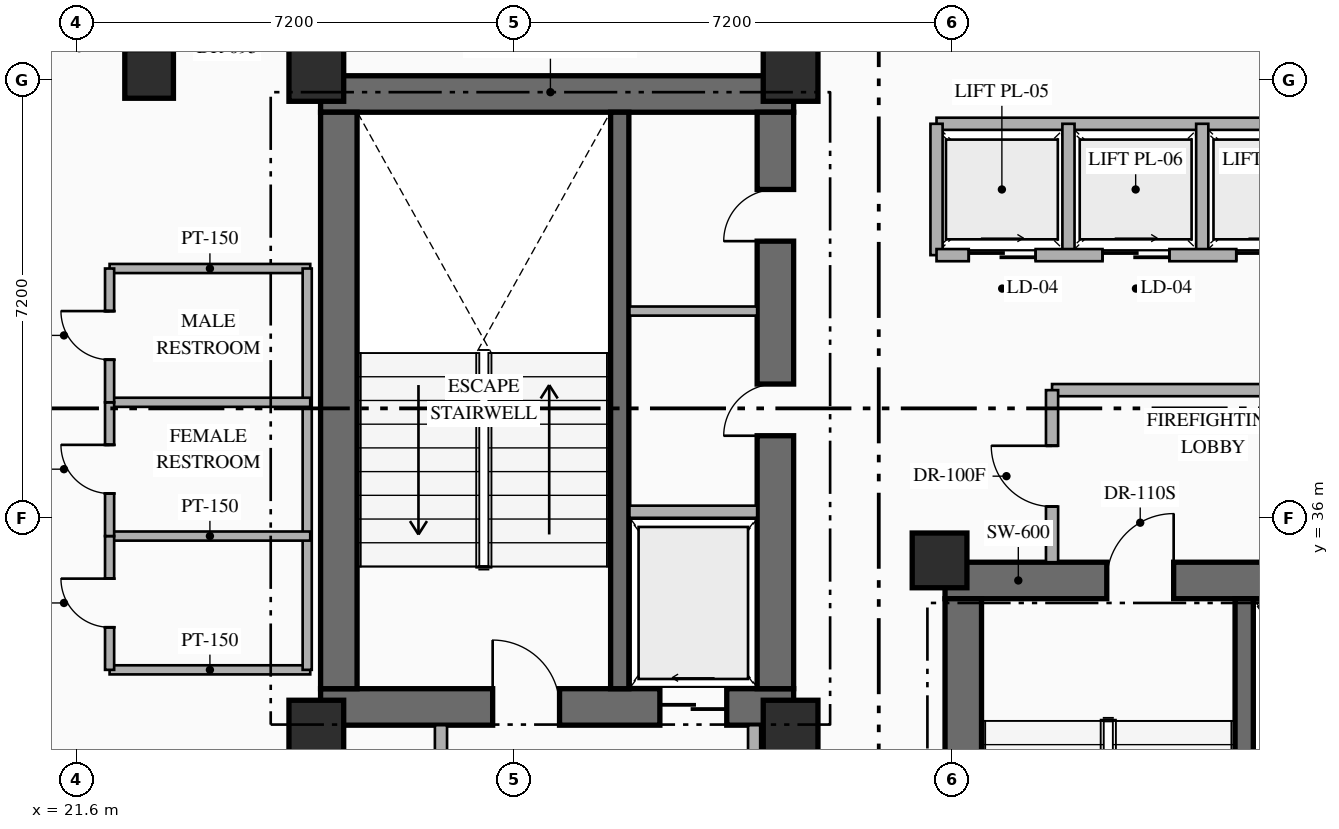
"""IFC4 building model, lengths in metres.
Left out: names, types, materials, properties, quantities, classifications, styles, units other than length and angle.
Written with IfcOpenShell. Run it as: python <this file> out.ifc"""

import sys

from ifc_helpers import new_model, si_unit, direction, frame, frame_2d, origin, origin_2d, place, context, subcontext, project, spatial, rectangle, hollow_rectangle, extrude, element, fill, save


model = new_model("IFC4")
c1 = context("Model", 3, precision=1e-05, world=origin(), true_north=direction((0.0, 1.0)))
c2 = subcontext(c1, "Body", "Model", "MODEL_VIEW")
j1 = project(units=[si_unit("LENGTHUNIT", "METRE"), si_unit("PLANEANGLEUNIT", "RADIAN")], contexts=[c1])
p1 = place(None, origin())
s1 = spatial("IfcSite", under=j1, at=p1, CompositionType="ELEMENT")
p2 = place(p1, origin())
s2 = spatial("IfcBuilding", under=s1, at=p2, CompositionType="ELEMENT")
p3 = place(p2, frame((0.0, 0.0, 156.45)))
s3 = spatial("IfcBuildingStorey", under=s2, at=p3, CompositionType="ELEMENT", Elevation=156.45)
p4 = place(p3, frame((25.62, 32.89, 0.0), z_axis=(0.0, 0.0, 1.0), x_axis=(1.0, 0.0, 0.0)))
e1 = element("IfcWall", 1, at=p4, inside=s3, PredefinedType="SHEAR", context=c2, shape_type="SweptSolid", body=[
    extrude(rectangle(XDim=7.78, YDim=0.6, at=frame_2d((3.89, 0.0))), origin(), (0.0, 0.0, 1.0), 3.6),
])
p5 = place(p4, frame((2.83, 0.0, 0.0)))
e2 = element("IfcOpeningElement", 2, at=p5, cuts=e1, PredefinedType="OPENING", context=c2, shape_type="SweptSolid", body=[
    extrude(rectangle(XDim=1.1, YDim=2.2, at=frame_2d((0.55, 1.1))), frame((0.0, 0.31, 0.0), z_axis=(0.0, -1.0, 0.0), x_axis=(1.0, 0.0, 0.0)), (0.0, 0.0, 1.0), 0.62),
])
p6 = place(p4, frame((5.58, 0.0, 0.0)))
e3 = element("IfcOpeningElement", 3, at=p6, cuts=e1, PredefinedType="OPENING", context=c2, shape_type="SweptSolid", body=[
    extrude(rectangle(XDim=1.1, YDim=2.15, at=frame_2d((0.55, 1.075))), frame((0.0, 0.31, 0.0), z_axis=(0.0, -1.0, 0.0), x_axis=(1.0, 0.0, 0.0)), (0.0, 0.0, 1.0), 0.62),
])
p7 = place(p3, frame((25.62, 42.97, 0.0), z_axis=(0.0, 0.0, 1.0), x_axis=(1.0, 0.0, 0.0)))
e4 = element("IfcWall", 4, at=p7, inside=s3, PredefinedType="SHEAR", context=c2, shape_type="SweptSolid", body=[
    extrude(rectangle(XDim=7.78, YDim=0.6, at=frame_2d((3.89, 0.0))), origin(), (0.0, 0.0, 1.0), 3.6),
])
p8 = place(p3, frame((25.92, 33.19, 0.0), z_axis=(0.0, 0.0, 1.0), x_axis=(0.0, 1.0, 0.0)))
e5 = element("IfcWall", 5, at=p8, inside=s3, PredefinedType="SHEAR", context=c2, shape_type="SweptSolid", body=[
    extrude(rectangle(XDim=9.48, YDim=0.6, at=frame_2d((4.74, 0.0))), origin(), (0.0, 0.0, 1.0), 3.6),
])
p9 = place(p3, frame((33.1, 33.19, 0.0), z_axis=(0.0, 0.0, 1.0), x_axis=(0.0, 1.0, 0.0)))
e6 = element("IfcWall", 6, at=p9, inside=s3, PredefinedType="SHEAR", context=c2, shape_type="SweptSolid", body=[
    extrude(rectangle(XDim=9.48, YDim=0.6, at=frame_2d((4.74, 0.0))), origin(), (0.0, 0.0, 1.0), 3.6),
])
p10 = place(p9, frame((4.16, 0.0, 0.0)))
e7 = element("IfcOpeningElement", 7, at=p10, cuts=e6, PredefinedType="OPENING", context=c2, shape_type="SweptSolid", body=[
    extrude(rectangle(XDim=0.85, YDim=2.08, at=frame_2d((0.425, 1.04))), frame((0.0, 0.31, 0.0), z_axis=(0.0, -1.0, 0.0), x_axis=(1.0, 0.0, 0.0)), (0.0, 0.0, 1.0), 0.62),
])
p11 = place(p9, frame((7.36, 0.0, 0.0)))
e8 = element("IfcOpeningElement", 8, at=p11, cuts=e6, PredefinedType="OPENING", context=c2, shape_type="SweptSolid", body=[
    extrude(rectangle(XDim=0.85, YDim=2.08, at=frame_2d((0.425, 1.04))), frame((0.0, 0.31, 0.0), z_axis=(0.0, -1.0, 0.0), x_axis=(1.0, 0.0, 0.0)), (0.0, 0.0, 1.0), 0.62),
])
p12 = place(p3, frame((30.54, 33.19, 0.0), z_axis=(0.0, 0.0, 1.0), x_axis=(0.0, 1.0, 0.0)))
e9 = element("IfcWall", 9, at=p12, inside=s3, PredefinedType="SHEAR", context=c2, shape_type="SweptSolid", body=[
    extrude(rectangle(XDim=9.48, YDim=0.3, at=frame_2d((4.74, 0.0))), origin(), (0.0, 0.0, 1.0), 3.6),
])
p13 = place(p3, frame((35.89, 34.97, 0.0), z_axis=(0.0, 0.0, 1.0), x_axis=(1.0, 0.0, 0.0)))
e10 = element("IfcWall", 10, at=p13, inside=s3, PredefinedType="SHEAR", context=c2, shape_type="SweptSolid", body=[
    extrude(rectangle(XDim=7.76, YDim=0.6, at=frame_2d((3.88, 0.0))), origin(), (0.0, 0.0, 1.0), 3.6),
])
p14 = place(p13, frame((2.66, 0.0, 0.0)))
e11 = element("IfcOpeningElement", 11, at=p14, cuts=e10, PredefinedType="OPENING", context=c2, shape_type="SweptSolid", body=[
    extrude(rectangle(XDim=1.1, YDim=2.2, at=frame_2d((0.55, 1.1))), frame((0.0, 0.31, 0.0), z_axis=(0.0, -1.0, 0.0), x_axis=(1.0, 0.0, 0.0)), (0.0, 0.0, 1.0), 0.62),
])
p15 = place(p13, frame((5.56, 0.0, 0.0)))
e12 = element("IfcOpeningElement", 12, at=p15, cuts=e10, PredefinedType="OPENING", context=c2, shape_type="SweptSolid", body=[
    extrude(rectangle(XDim=1.12, YDim=2.15, at=frame_2d((0.56, 1.075))), frame((0.0, 0.31, 0.0), z_axis=(0.0, -1.0, 0.0), x_axis=(1.0, 0.0, 0.0)), (0.0, 0.0, 1.0), 0.62),
])
p16 = place(p3, frame((36.19, 25.19, 0.0), z_axis=(0.0, 0.0, 1.0), x_axis=(0.0, 1.0, 0.0)))
e13 = element("IfcWall", 13, at=p16, inside=s3, PredefinedType="SHEAR", context=c2, shape_type="SweptSolid", body=[
    extrude(rectangle(XDim=9.48, YDim=0.6, at=frame_2d((4.74, 0.0))), origin(), (0.0, 0.0, 1.0), 3.6),
])
p17 = place(p3, frame((40.81, 25.19, 0.0), z_axis=(0.0, 0.0, 1.0), x_axis=(0.0, 1.0, 0.0)))
e14 = element("IfcWall", 14, at=p17, inside=s3, PredefinedType="SHEAR", context=c2, shape_type="SweptSolid", body=[
    extrude(rectangle(XDim=9.48, YDim=0.3, at=frame_2d((4.74, 0.0))), origin(), (0.0, 0.0, 1.0), 3.6),
])
for number, where, z_axis, x_axis in (
    (15, (25.55, 32.55, 0.0), (0.0, 0.0, 1.0), (1.0, 0.0, 0.0)),
    (16, (33.35, 32.55, 0.0), (0.0, 0.0, 1.0), (1.0, 0.0, 0.0)),
    (17, (25.55, 43.3, 0.0), (0.0, 0.0, 1.0), (1.0, 0.0, 0.0)),
    (18, (33.35, 43.3, 0.0), (0.0, 0.0, 1.0), (1.0, 0.0, 0.0)),
    (19, (35.8, 35.3, 0.0), (0.0, 0.0, 1.0), (1.0, 0.0, 0.0)),
):
    element("IfcColumn", number, at=place(p3, frame(where, z_axis=z_axis, x_axis=x_axis)), inside=s3, PredefinedType="COLUMN", context=c2, shape_type="SweptSolid", body=[
        extrude(rectangle(XDim=0.9, YDim=0.9, at=origin_2d()), origin(), (0.0, 0.0, 1.0), 3.6),
    ])
p18 = place(p3, frame((22.8, 43.3, 0.0), z_axis=(0.0, 0.0, 1.0), x_axis=(1.0, 0.0, 0.0)))
e20 = element("IfcColumn", 20, at=p18, inside=s3, PredefinedType="COLUMN", context=c2, shape_type="SweptSolid", body=[
    extrude(hollow_rectangle(XDim=0.8, YDim=0.8, WallThickness=0.032, at=origin_2d()), origin(), (0.0, 0.0, 1.0), 3.6),
])
p19 = place(p3, frame((30.7, 36.1, 0.0), z_axis=(0.0, 0.0, 1.0), x_axis=(1.0, 0.0, 0.0)))
e21 = element("IfcWall", 21, at=p19, inside=s3, PredefinedType="STANDARD", context=c2, shape_type="SweptSolid", body=[
    extrude(rectangle(XDim=2.1, YDim=0.2, at=frame_2d((1.05, 0.0))), origin(), (0.0, 0.0, 1.0), 3.35),
])
p20 = place(p3, frame((30.7, 39.4, 0.0), z_axis=(0.0, 0.0, 1.0), x_axis=(1.0, 0.0, 0.0)))
e22 = element("IfcWall", 22, at=p20, inside=s3, PredefinedType="PARTITIONING", context=c2, shape_type="SweptSolid", body=[
    extrude(rectangle(XDim=2.1, YDim=0.15, at=frame_2d((1.05, 0.0))), origin(), (0.0, 0.0, 1.0), 3.35),
])
p21 = place(p3, frame((27.6, 29.2, 0.0), z_axis=(0.0, 0.0, 1.0), x_axis=(0.0, 1.0, 0.0)))
e23 = element("IfcWall", 23, at=p21, inside=s3, PredefinedType="STANDARD", context=c2, shape_type="SweptSolid", body=[
    extrude(rectangle(XDim=3.39, YDim=0.2, at=frame_2d((1.695, 0.0))), origin(), (0.0, 0.0, 1.0), 3.35),
])
p22 = place(p3, frame((32.75, 29.2, 0.0), z_axis=(0.0, 0.0, 1.0), x_axis=(0.0, 1.0, 0.0)))
e24 = element("IfcWall", 24, at=p22, inside=s3, PredefinedType="STANDARD", context=c2, shape_type="SweptSolid", body=[
    extrude(rectangle(XDim=3.39, YDim=0.2, at=frame_2d((1.695, 0.0))), origin(), (0.0, 0.0, 1.0), 3.35),
])
p23 = place(p22, frame((1.45, 0.0, 0.0)))
e25 = element("IfcOpeningElement", 25, at=p23, cuts=e24, PredefinedType="OPENING", context=c2, shape_type="SweptSolid", body=[
    extrude(rectangle(XDim=1.0, YDim=2.2, at=frame_2d((0.5, 1.1))), frame((0.0, 0.11, 0.0), z_axis=(0.0, -1.0, 0.0), x_axis=(1.0, 0.0, 0.0)), (0.0, 0.0, 1.0), 0.22),
])
p24 = place(p3, frame((37.65, 38.1, 0.0), z_axis=(0.0, 0.0, 1.0), x_axis=(1.0, 0.0, 0.0)))
e26 = element("IfcWall", 26, at=p24, inside=s3, PredefinedType="STANDARD", context=c2, shape_type="SweptSolid", body=[
    extrude(rectangle(XDim=5.3, YDim=0.2, at=frame_2d((2.65, 0.0))), origin(), (0.0, 0.0, 1.0), 3.35),
])
p25 = place(p3, frame((37.65, 35.27, 0.0), z_axis=(0.0, 0.0, 1.0), x_axis=(0.0, 1.0, 0.0)))
e27 = element("IfcWall", 27, at=p25, inside=s3, PredefinedType="STANDARD", context=c2, shape_type="SweptSolid", body=[
    extrude(rectangle(XDim=2.83, YDim=0.2, at=frame_2d((1.415, 0.0))), origin(), (0.0, 0.0, 1.0), 3.35),
])
p26 = place(p25, frame((0.915, 0.0, 0.0)))
e28 = element("IfcOpeningElement", 28, at=p26, cuts=e27, PredefinedType="OPENING", context=c2, shape_type="SweptSolid", body=[
    extrude(rectangle(XDim=1.0, YDim=2.2, at=frame_2d((0.5, 1.1))), frame((0.0, 0.11, 0.0), z_axis=(0.0, -1.0, 0.0), x_axis=(1.0, 0.0, 0.0)), (0.0, 0.0, 1.0), 0.22),
])
p27 = place(p3, frame((35.75, 42.48, 0.0), z_axis=(0.0, 0.0, 1.0), x_axis=(1.0, 0.0, 0.0)))
e29 = element("IfcWall", 29, at=p27, inside=s3, PredefinedType="STANDARD", context=c2, shape_type="SweptSolid", body=[
    extrude(rectangle(XDim=9.11, YDim=0.2, at=frame_2d((4.555, 0.0))), origin(), (0.0, 0.0, 1.0), 3.35),
])
for number, where, z_axis, x_axis in (
    (30, (35.75, 40.32, 0.0), (0.0, 0.0, 1.0), (0.0, 1.0, 0.0)),
    (31, (37.92, 40.32, 0.0), (0.0, 0.0, 1.0), (0.0, 1.0, 0.0)),
    (32, (40.12, 40.32, 0.0), (0.0, 0.0, 1.0), (0.0, 1.0, 0.0)),
):
    element("IfcWall", number, at=place(p3, frame(where, z_axis=z_axis, x_axis=x_axis)), inside=s3, PredefinedType="STANDARD", context=c2, shape_type="SweptSolid", body=[
        extrude(rectangle(XDim=2.16, YDim=0.2, at=frame_2d((1.08, 0.0))), origin(), (0.0, 0.0, 1.0), 3.35),
    ])
p28 = place(p3, frame((35.75, 40.32, 0.0), z_axis=(0.0, 0.0, 1.0), x_axis=(1.0, 0.0, 0.0)))
e33 = element("IfcWall", 33, at=p28, inside=s3, PredefinedType="STANDARD", context=c2, shape_type="SweptSolid", body=[
    extrude(rectangle(XDim=9.11, YDim=0.2, at=frame_2d((4.555, 0.0))), origin(), (0.0, 0.0, 1.0), 3.35),
])
p29 = place(p28, frame((0.53, 0.0, 0.0)))
e34 = element("IfcOpeningElement", 34, at=p29, cuts=e33, PredefinedType="OPENING", context=c2, shape_type="SweptSolid", body=[
    extrude(rectangle(XDim=1.1, YDim=2.18, at=frame_2d((0.55, 1.09))), frame((0.0, 0.11, 0.0), z_axis=(0.0, -1.0, 0.0), x_axis=(1.0, 0.0, 0.0)), (0.0, 0.0, 1.0), 0.22),
])
p30 = place(p28, frame((2.73, 0.0, 0.0)))
e35 = element("IfcOpeningElement", 35, at=p30, cuts=e33, PredefinedType="OPENING", context=c2, shape_type="SweptSolid", body=[
    extrude(rectangle(XDim=1.1, YDim=2.18, at=frame_2d((0.55, 1.09))), frame((0.0, 0.11, 0.0), z_axis=(0.0, -1.0, 0.0), x_axis=(1.0, 0.0, 0.0)), (0.0, 0.0, 1.0), 0.22),
])
p31 = place(p28, frame((4.93, 0.0, 0.0)))
e36 = element("IfcOpeningElement", 36, at=p31, cuts=e33, PredefinedType="OPENING", context=c2, shape_type="SweptSolid", body=[
    extrude(rectangle(XDim=1.1, YDim=2.18, at=frame_2d((0.55, 1.09))), frame((0.0, 0.11, 0.0), z_axis=(0.0, -1.0, 0.0), x_axis=(1.0, 0.0, 0.0)), (0.0, 0.0, 1.0), 0.22),
])
p32 = place(p28, frame((7.13, 0.0, 0.0)))
e37 = element("IfcOpeningElement", 37, at=p32, cuts=e33, PredefinedType="OPENING", context=c2, shape_type="SweptSolid", body=[
    extrude(rectangle(XDim=1.1, YDim=2.18, at=frame_2d((0.55, 1.09))), frame((0.0, 0.11, 0.0), z_axis=(0.0, -1.0, 0.0), x_axis=(1.0, 0.0, 0.0)), (0.0, 0.0, 1.0), 0.22),
])
for number, where, z_axis, x_axis in (
    (38, (22.15, 33.5, 0.0), (0.0, 0.0, 1.0), (1.0, 0.0, 0.0)),
    (39, (22.15, 40.1, 0.0), (0.0, 0.0, 1.0), (1.0, 0.0, 0.0)),
):
    element("IfcWall", number, at=place(p3, frame(where, z_axis=z_axis, x_axis=x_axis)), inside=s3, PredefinedType="PARTITIONING", context=c2, shape_type="SweptSolid", body=[
        extrude(rectangle(XDim=3.3, YDim=0.15, at=frame_2d((1.65, 0.0))), origin(), (0.0, 0.0, 1.0), 3.35),
    ])
p33 = place(p3, frame((25.4, 33.5, 0.0), z_axis=(0.0, 0.0, 1.0), x_axis=(0.0, 1.0, 0.0)))
e40 = element("IfcWall", 40, at=p33, inside=s3, PredefinedType="PARTITIONING", context=c2, shape_type="SweptSolid", body=[
    extrude(rectangle(XDim=6.6, YDim=0.15, at=frame_2d((3.3, 0.0))), origin(), (0.0, 0.0, 1.0), 3.35),
])
for number, where, z_axis, x_axis in (
    (41, (22.15, 35.7, 0.0), (0.0, 0.0, 1.0), (1.0, 0.0, 0.0)),
    (42, (22.15, 37.9, 0.0), (0.0, 0.0, 1.0), (1.0, 0.0, 0.0)),
):
    element("IfcWall", number, at=place(p3, frame(where, z_axis=z_axis, x_axis=x_axis)), inside=s3, PredefinedType="PARTITIONING", context=c2, shape_type="SweptSolid", body=[
        extrude(rectangle(XDim=3.3, YDim=0.15, at=frame_2d((1.65, 0.0))), origin(), (0.0, 0.0, 1.0), 3.35),
    ])
p34 = place(p3, frame((22.15, 33.5, 0.0), z_axis=(0.0, 0.0, 1.0), x_axis=(0.0, 1.0, 0.0)))
e43 = element("IfcWall", 43, at=p34, inside=s3, PredefinedType="PARTITIONING", context=c2, shape_type="SweptSolid", body=[
    extrude(rectangle(XDim=2.2, YDim=0.15, at=frame_2d((1.1, 0.0))), origin(), (0.0, 0.0, 1.0), 3.35),
])
p35 = place(p34, frame((0.7, 0.0, 0.0)))
e44 = element("IfcOpeningElement", 44, at=p35, cuts=e43, PredefinedType="OPENING", context=c2, shape_type="SweptSolid", body=[
    extrude(rectangle(XDim=0.8, YDim=2.06, at=frame_2d((0.4, 1.03))), frame((0.0, 0.085, 0.0), z_axis=(0.0, -1.0, 0.0), x_axis=(1.0, 0.0, 0.0)), (0.0, 0.0, 1.0), 0.17),
])
p36 = place(p3, frame((22.15, 35.7, 0.0), z_axis=(0.0, 0.0, 1.0), x_axis=(0.0, 1.0, 0.0)))
e45 = element("IfcWall", 45, at=p36, inside=s3, PredefinedType="PARTITIONING", context=c2, shape_type="SweptSolid", body=[
    extrude(rectangle(XDim=2.2, YDim=0.15, at=frame_2d((1.1, 0.0))), origin(), (0.0, 0.0, 1.0), 3.35),
])
p37 = place(p36, frame((0.7, 0.0, 0.0)))
e46 = element("IfcOpeningElement", 46, at=p37, cuts=e45, PredefinedType="OPENING", context=c2, shape_type="SweptSolid", body=[
    extrude(rectangle(XDim=0.8, YDim=2.06, at=frame_2d((0.4, 1.03))), frame((0.0, 0.085, 0.0), z_axis=(0.0, -1.0, 0.0), x_axis=(1.0, 0.0, 0.0)), (0.0, 0.0, 1.0), 0.17),
])
p38 = place(p3, frame((22.15, 37.9, 0.0), z_axis=(0.0, 0.0, 1.0), x_axis=(0.0, 1.0, 0.0)))
e47 = element("IfcWall", 47, at=p38, inside=s3, PredefinedType="PARTITIONING", context=c2, shape_type="SweptSolid", body=[
    extrude(rectangle(XDim=2.2, YDim=0.15, at=frame_2d((1.1, 0.0))), origin(), (0.0, 0.0, 1.0), 3.35),
])
p39 = place(p38, frame((0.7, 0.0, 0.0)))
e48 = element("IfcOpeningElement", 48, at=p39, cuts=e47, PredefinedType="OPENING", context=c2, shape_type="SweptSolid", body=[
    extrude(rectangle(XDim=0.8, YDim=2.06, at=frame_2d((0.4, 1.03))), frame((0.0, 0.085, 0.0), z_axis=(0.0, -1.0, 0.0), x_axis=(1.0, 0.0, 0.0)), (0.0, 0.0, 1.0), 0.17),
])
p40 = place(p5, origin())
e49 = element("IfcDoor", 49, at=p40, inside=s3, OperationType="SINGLE_SWING_LEFT", PredefinedType="DOOR", context=c2, shape_type="SweptSolid", body=[
    extrude(rectangle(XDim=1.1, YDim=2.2, at=frame_2d((0.55, 1.1))), frame((0.0, 0.025, 0.0), z_axis=(0.0, -1.0, 0.0), x_axis=(1.0, 0.0, 0.0)), (0.0, 0.0, 1.0), 0.05),
])
fill(e2, e49)
p41 = place(p6, origin())
e50 = element("IfcDoor", 50, at=p41, inside=s3, OperationType="SLIDING_TO_LEFT", PredefinedType="USERDEFINED", context=c2, shape_type="SweptSolid", body=[
    extrude(rectangle(XDim=1.1, YDim=2.15, at=frame_2d((0.55, 1.075))), frame((0.0, 0.025, 0.0), z_axis=(0.0, -1.0, 0.0), x_axis=(1.0, 0.0, 0.0)), (0.0, 0.0, 1.0), 0.05),
])
fill(e3, e50)
p42 = place(p14, origin())
e51 = element("IfcDoor", 51, at=p42, inside=s3, OperationType="SINGLE_SWING_RIGHT", PredefinedType="DOOR", context=c2, shape_type="SweptSolid", body=[
    extrude(rectangle(XDim=1.1, YDim=2.2, at=frame_2d((0.55, 1.1))), frame((0.0, 0.025, 0.0), z_axis=(0.0, -1.0, 0.0), x_axis=(1.0, 0.0, 0.0)), (0.0, 0.0, 1.0), 0.05),
])
fill(e11, e51)
p43 = place(p10, origin())
e52 = element("IfcDoor", 52, at=p43, inside=s3, OperationType="SINGLE_SWING_LEFT", PredefinedType="DOOR", context=c2, shape_type="SweptSolid", body=[
    extrude(rectangle(XDim=0.85, YDim=2.08, at=frame_2d((0.425, 1.04))), frame((0.0, 0.025, 0.0), z_axis=(0.0, -1.0, 0.0), x_axis=(1.0, 0.0, 0.0)), (0.0, 0.0, 1.0), 0.05),
])
fill(e7, e52)
p44 = place(p11, origin())
e53 = element("IfcDoor", 53, at=p44, inside=s3, OperationType="SINGLE_SWING_LEFT", PredefinedType="DOOR", context=c2, shape_type="SweptSolid", body=[
    extrude(rectangle(XDim=0.85, YDim=2.08, at=frame_2d((0.425, 1.04))), frame((0.0, 0.025, 0.0), z_axis=(0.0, -1.0, 0.0), x_axis=(1.0, 0.0, 0.0)), (0.0, 0.0, 1.0), 0.05),
])
fill(e8, e53)
p45 = place(p26, origin())
e54 = element("IfcDoor", 54, at=p45, inside=s3, OperationType="SINGLE_SWING_RIGHT", PredefinedType="DOOR", context=c2, shape_type="SweptSolid", body=[
    extrude(rectangle(XDim=1.0, YDim=2.2, at=frame_2d((0.5, 1.1))), frame((0.0, 0.025, 0.0), z_axis=(0.0, -1.0, 0.0), x_axis=(1.0, 0.0, 0.0)), (0.0, 0.0, 1.0), 0.05),
])
fill(e28, e54)
p46 = place(p29, origin())
e55 = element("IfcDoor", 55, at=p46, inside=s3, OperationType="SLIDING_TO_RIGHT", PredefinedType="USERDEFINED", context=c2, shape_type="SweptSolid", body=[
    extrude(rectangle(XDim=1.1, YDim=2.18, at=frame_2d((0.55, 1.09))), frame((0.0, 0.025, 0.0), z_axis=(0.0, -1.0, 0.0), x_axis=(1.0, 0.0, 0.0)), (0.0, 0.0, 1.0), 0.05),
])
fill(e34, e55)
p47 = place(p30, origin())
e56 = element("IfcDoor", 56, at=p47, inside=s3, OperationType="SLIDING_TO_RIGHT", PredefinedType="USERDEFINED", context=c2, shape_type="SweptSolid", body=[
    extrude(rectangle(XDim=1.1, YDim=2.18, at=frame_2d((0.55, 1.09))), frame((0.0, 0.025, 0.0), z_axis=(0.0, -1.0, 0.0), x_axis=(1.0, 0.0, 0.0)), (0.0, 0.0, 1.0), 0.05),
])
fill(e35, e56)
p48 = place(p31, origin())
e57 = element("IfcDoor", 57, at=p48, inside=s3, OperationType="SLIDING_TO_RIGHT", PredefinedType="USERDEFINED", context=c2, shape_type="SweptSolid", body=[
    extrude(rectangle(XDim=1.1, YDim=2.18, at=frame_2d((0.55, 1.09))), frame((0.0, 0.025, 0.0), z_axis=(0.0, -1.0, 0.0), x_axis=(1.0, 0.0, 0.0)), (0.0, 0.0, 1.0), 0.05),
])
fill(e36, e57)
p49 = place(p35, origin())
e58 = element("IfcDoor", 58, at=p49, inside=s3, OperationType="SINGLE_SWING_RIGHT", PredefinedType="DOOR", context=c2, shape_type="SweptSolid", body=[
    extrude(rectangle(XDim=0.8, YDim=2.06, at=frame_2d((0.4, 1.03))), frame((0.0, 0.025, 0.0), z_axis=(0.0, -1.0, 0.0), x_axis=(1.0, 0.0, 0.0)), (0.0, 0.0, 1.0), 0.05),
])
fill(e44, e58)
p50 = place(p37, origin())
e59 = element("IfcDoor", 59, at=p50, inside=s3, OperationType="SINGLE_SWING_RIGHT", PredefinedType="DOOR", context=c2, shape_type="SweptSolid", body=[
    extrude(rectangle(XDim=0.8, YDim=2.06, at=frame_2d((0.4, 1.03))), frame((0.0, 0.025, 0.0), z_axis=(0.0, -1.0, 0.0), x_axis=(1.0, 0.0, 0.0)), (0.0, 0.0, 1.0), 0.05),
])
fill(e46, e59)
p51 = place(p39, origin())
e60 = element("IfcDoor", 60, at=p51, inside=s3, OperationType="SINGLE_SWING_RIGHT", PredefinedType="DOOR", context=c2, shape_type="SweptSolid", body=[
    extrude(rectangle(XDim=0.8, YDim=2.06, at=frame_2d((0.4, 1.03))), frame((0.0, 0.025, 0.0), z_axis=(0.0, -1.0, 0.0), x_axis=(1.0, 0.0, 0.0)), (0.0, 0.0, 1.0), 0.05),
])
fill(e48, e60)
save(model, sys.argv[1])
